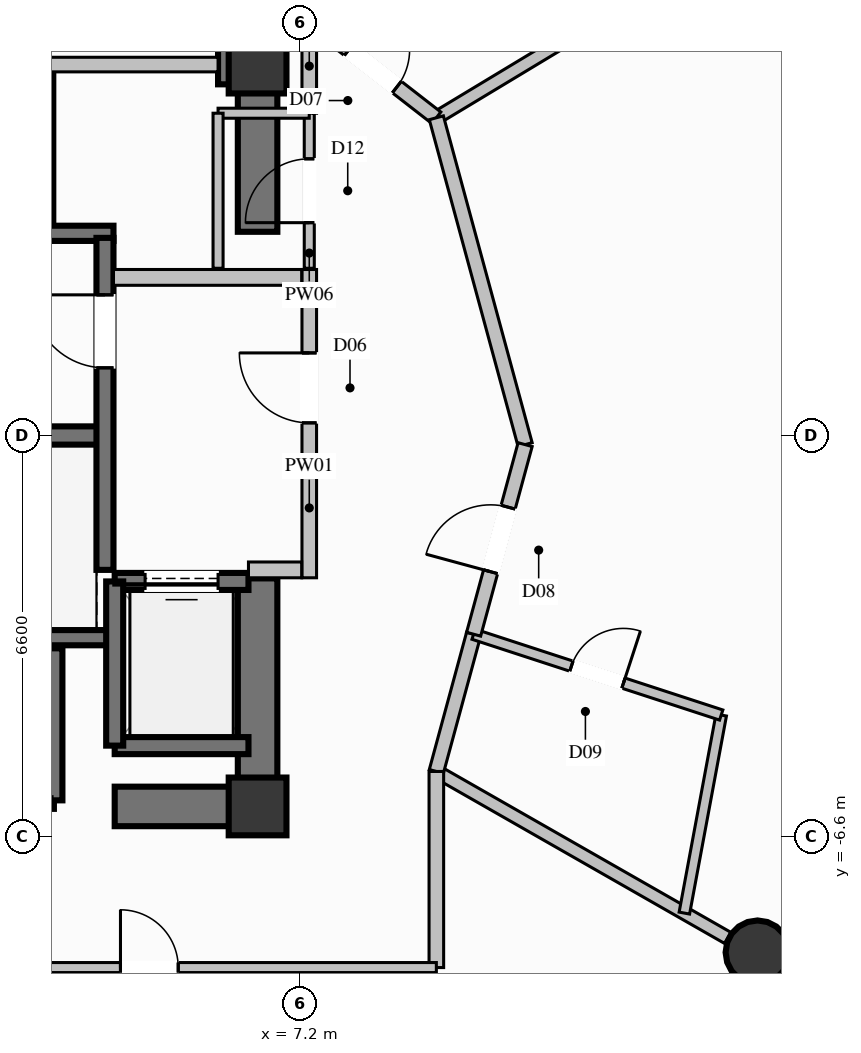
"""IFC4 building model, lengths in metres.
Left out: names, types, materials, properties, quantities, classifications, styles, units other than length and angle.
Written with IfcOpenShell. Run it as: python <this file> out.ifc"""

import sys

from ifc_helpers import new_model, si_unit, direction, frame, frame_2d, origin, origin_2d, place, context, subcontext, project, spatial, rectangle, circle, extrude, element, fill, save


model = new_model("IFC4")
c1 = context("Model", 3, precision=1e-05, world=origin(), true_north=direction((0.0, 1.0)))
c2 = subcontext(c1, "Body", "Model", "MODEL_VIEW")
j1 = project(units=[si_unit("LENGTHUNIT", "METRE"), si_unit("PLANEANGLEUNIT", "RADIAN")], contexts=[c1])
p1 = place(None, origin())
s1 = spatial("IfcSite", under=j1, at=p1, CompositionType="ELEMENT")
p2 = place(p1, origin())
s2 = spatial("IfcBuilding", under=s1, at=p2, CompositionType="ELEMENT")
p3 = place(p2, frame((0.0, 0.0, 153.0)))
s3 = spatial("IfcBuildingStorey", under=s2, at=p3, CompositionType="ELEMENT", Elevation=153.0)
for number, where, z_axis, x_axis in (
    (1, (6.5, -6.1, 0.0), (0.0, 0.0, 1.0), (1.0, 0.0, 0.0)),
    (2, (6.5, 6.1, 0.0), (0.0, 0.0, 1.0), (1.0, 0.0, 0.0)),
):
    element("IfcColumn", number, at=place(p3, frame(where, z_axis=z_axis, x_axis=x_axis)), inside=s3, PredefinedType="COLUMN", context=c2, shape_type="SweptSolid", body=[
        extrude(rectangle(XDim=0.95, YDim=0.95, at=origin_2d()), origin(), (0.0, 0.0, 1.0), 3.6),
    ])
p4 = place(p3, frame((-3.99, 0.0, 0.0), z_axis=(0.0, 0.0, 1.0), x_axis=(1.0, 0.0, 0.0)))
e3 = element("IfcWall", 3, at=p4, inside=s3, PredefinedType="SHEAR", context=c2, shape_type="SweptSolid", body=[
    extrude(rectangle(XDim=7.98, YDim=0.3, at=frame_2d((3.99, 0.0))), origin(), (0.0, 0.0, 1.0), 3.6),
])
for number, where, z_axis, x_axis in (
    (4, (-4.13, -3.325, 0.0), (0.0, 0.0, 1.0), (1.0, 0.0, 0.0)),
    (5, (-4.13, 3.325, 0.0), (0.0, 0.0, 1.0), (1.0, 0.0, 0.0)),
):
    element("IfcWall", number, at=place(p3, frame(where, z_axis=z_axis, x_axis=x_axis)), inside=s3, PredefinedType="SOLIDWALL", context=c2, shape_type="SweptSolid", body=[
        extrude(rectangle(XDim=8.26, YDim=0.25, at=frame_2d((4.13, 0.0))), origin(), (0.0, 0.0, 1.0), 3.6),
    ])
p5 = place(p3, frame((4.15, -6.1, 0.0), z_axis=(0.0, 0.0, 1.0), x_axis=(1.0, 0.0, 0.0)))
e6 = element("IfcWall", 6, at=p5, inside=s3, PredefinedType="SHEAR", context=c2, shape_type="SweptSolid", body=[
    extrude(rectangle(XDim=2.025, YDim=0.65, at=frame_2d((1.013, 0.0))), origin(), (0.0, 0.0, 1.0), 3.6),
])
p6 = place(p3, frame((5.85, 6.1, 0.0), z_axis=(0.0, 0.0, 1.0), x_axis=(1.0, 0.0, 0.0)))
e7 = element("IfcWall", 7, at=p6, inside=s3, PredefinedType="SHEAR", context=c2, shape_type="SweptSolid", body=[
    extrude(rectangle(XDim=0.325, YDim=0.65, at=frame_2d((0.163, 0.0))), origin(), (0.0, 0.0, 1.0), 3.6),
])
p7 = place(p3, frame((6.5, -6.425, 0.0), z_axis=(0.0, 0.0, 1.0), x_axis=(0.0, 1.0, 0.0)))
e8 = element("IfcWall", 8, at=p7, inside=s3, PredefinedType="SHEAR", context=c2, shape_type="SweptSolid", body=[
    extrude(rectangle(XDim=4.075, YDim=0.65, at=frame_2d((2.038, 0.0))), origin(), (0.0, 0.0, 1.0), 3.6),
])
p8 = place(p3, frame((6.5, 3.35, 0.0), z_axis=(0.0, 0.0, 1.0), x_axis=(0.0, 1.0, 0.0)))
e9 = element("IfcWall", 9, at=p8, inside=s3, PredefinedType="SHEAR", context=c2, shape_type="SweptSolid", body=[
    extrude(rectangle(XDim=3.075, YDim=0.65, at=frame_2d((1.538, 0.0))), origin(), (0.0, 0.0, 1.0), 3.6),
])
p9 = place(p3, frame((14.722, -8.5, 0.0), z_axis=(0.0, 0.0, 1.0), x_axis=(1.0, 0.0, 0.0)))
e10 = element("IfcColumn", 10, at=p9, inside=s3, PredefinedType="COLUMN", context=c2, shape_type="SweptSolid", body=[
    extrude(circle(Radius=0.525, at=origin_2d()), origin(), (0.0, 0.0, 1.0), 3.6),
])
p10 = place(p3, frame((1.05, -6.0, 0.0), z_axis=(0.0, 0.0, 1.0), x_axis=(1.0, 0.0, 0.0)))
e11 = element("IfcWall", 11, at=p10, inside=s3, PredefinedType="SOLIDWALL", context=c2, shape_type="SweptSolid", body=[
    extrude(rectangle(XDim=2.1, YDim=0.28, at=frame_2d((1.05, 0.0))), origin(), (0.0, 0.0, 1.0), 3.35),
])
p11 = place(p10, frame((0.5, 0.0, 0.0)))
e12 = element("IfcOpeningElement", 12, at=p11, cuts=e11, PredefinedType="OPENING", context=c2, shape_type="SweptSolid", body=[
    extrude(rectangle(XDim=1.1, YDim=2.2, at=frame_2d((0.55, 1.1))), frame((0.0, 0.15, 0.0), z_axis=(0.0, -1.0, 0.0), x_axis=(1.0, 0.0, 0.0)), (0.0, 0.0, 1.0), 0.3),
])
for number, where, z_axis, x_axis in (
    (13, (3.15, -6.0, 0.0), (0.0, 0.0, 1.0), (0.0, 1.0, 0.0)),
    (14, (3.0, 3.5, 0.0), (0.0, 0.0, 1.0), (0.0, 1.0, 0.0)),
):
    element("IfcWall", number, at=place(p3, frame(where, z_axis=z_axis, x_axis=x_axis)), inside=s3, PredefinedType="SOLIDWALL", context=c2, shape_type="SweptSolid", body=[
        extrude(rectangle(XDim=2.5, YDim=0.28, at=frame_2d((1.25, 0.0))), origin(), (0.0, 0.0, 1.0), 3.35),
    ])
p12 = place(p3, frame((4.15, -5.1, 0.0), z_axis=(0.0, 0.0, 1.0), x_axis=(1.0, 0.0, 0.0)))
e15 = element("IfcWall", 15, at=p12, inside=s3, PredefinedType="SOLIDWALL", context=c2, shape_type="SweptSolid", body=[
    extrude(rectangle(XDim=2.2, YDim=0.28, at=frame_2d((1.1, 0.0))), origin(), (0.0, 0.0, 1.0), 3.35),
])
p13 = place(p3, frame((6.35, -2.4, 0.0), z_axis=(0.0, 0.0, 1.0), x_axis=(-1.0, 0.0, 0.0)))
e16 = element("IfcWall", 16, at=p13, inside=s3, PredefinedType="SOLIDWALL", context=c2, shape_type="SweptSolid", body=[
    extrude(rectangle(XDim=2.2, YDim=0.28, at=frame_2d((1.1, 0.0))), origin(), (0.0, 0.0, 1.0), 3.35),
])
p14 = place(p13, frame((0.5, 0.0, 0.0)))
e17 = element("IfcOpeningElement", 17, at=p14, cuts=e16, PredefinedType="OPENING", context=c2, shape_type="SweptSolid", body=[
    extrude(rectangle(XDim=1.2, YDim=2.2, at=frame_2d((0.6, 1.1))), frame((0.0, 0.15, 0.0), z_axis=(0.0, -1.0, 0.0), x_axis=(1.0, 0.0, 0.0)), (0.0, 0.0, 1.0), 0.3),
])
p15 = place(p3, frame((4.15, -2.4, 0.0), z_axis=(0.0, 0.0, 1.0), x_axis=(0.0, -1.0, 0.0)))
e18 = element("IfcWall", 18, at=p15, inside=s3, PredefinedType="SOLIDWALL", context=c2, shape_type="SweptSolid", body=[
    extrude(rectangle(XDim=2.7, YDim=0.28, at=frame_2d((1.35, 0.0))), origin(), (0.0, 0.0, 1.0), 3.35),
])
p16 = place(p3, frame((3.99, -2.21, 0.0), z_axis=(0.0, 0.0, 1.0), x_axis=(0.0, 1.0, 0.0)))
e19 = element("IfcWall", 19, at=p16, inside=s3, PredefinedType="SOLIDWALL", context=c2, shape_type="SweptSolid", body=[
    extrude(rectangle(XDim=5.46, YDim=0.28, at=frame_2d((2.73, 0.0))), origin(), (0.0, 0.0, 1.0), 3.35),
])
p17 = place(p16, frame((3.323, 0.0, 0.0)))
e20 = element("IfcOpeningElement", 20, at=p17, cuts=e19, PredefinedType="OPENING", context=c2, shape_type="SweptSolid", body=[
    extrude(rectangle(XDim=1.2, YDim=2.2, at=frame_2d((0.6, 1.1))), frame((0.0, 0.15, 0.0), z_axis=(0.0, -1.0, 0.0), x_axis=(1.0, 0.0, 0.0)), (0.0, 0.0, 1.0), 0.3),
])
p18 = place(p3, frame((7.35, -2.34, 0.0), z_axis=(0.0, 0.0, 1.0), x_axis=(0.0, 1.0, 0.0)))
e21 = element("IfcWall", 21, at=p18, inside=s3, PredefinedType="PARTITIONING", context=c2, shape_type="SweptSolid", body=[
    extrude(rectangle(XDim=5.07, YDim=0.24, at=frame_2d((2.535, 0.0))), origin(), (0.0, 0.0, 1.0), 2.435),
])
p19 = place(p18, frame((2.548, 0.0, 0.0)))
e22 = element("IfcOpeningElement", 22, at=p19, cuts=e21, PredefinedType="OPENING", context=c2, shape_type="SweptSolid", body=[
    extrude(rectangle(XDim=1.15, YDim=2.2, at=frame_2d((0.575, 1.1))), frame((0.0, 0.13, 0.0), z_axis=(0.0, -1.0, 0.0), x_axis=(1.0, 0.0, 0.0)), (0.0, 0.0, 1.0), 0.26),
])
p20 = place(p3, frame((6.35, -2.21, 0.0), z_axis=(0.0, 0.0, 1.0), x_axis=(1.0, 0.0, 0.0)))
e23 = element("IfcWall", 23, at=p20, inside=s3, PredefinedType="PARTITIONING", context=c2, shape_type="SweptSolid", body=[
    extrude(rectangle(XDim=0.875, YDim=0.26, at=frame_2d((0.438, 0.0))), origin(), (0.0, 0.0, 1.0), 3.35),
])
p21 = place(p3, frame((4.13, 2.6, 0.0), z_axis=(0.0, 0.0, 1.0), x_axis=(1.0, 0.0, 0.0)))
e24 = element("IfcWall", 24, at=p21, inside=s3, PredefinedType="PARTITIONING", context=c2, shape_type="SweptSolid", body=[
    extrude(rectangle(XDim=3.095, YDim=0.26, at=frame_2d((1.548, 0.0))), origin(), (0.0, 0.0, 1.0), 3.35),
])
p22 = place(p3, frame((7.35, 5.3, 0.0), z_axis=(0.0, 0.0, 1.0), x_axis=(0.0, 1.0, 0.0)))
e25 = element("IfcWall", 25, at=p22, inside=s3, PredefinedType="PARTITIONING", context=c2, shape_type="SweptSolid", body=[
    extrude(rectangle(XDim=1.55, YDim=0.24, at=frame_2d((0.775, 0.0))), origin(), (0.0, 0.0, 1.0), 2.435),
])
p23 = place(p3, frame((3.0, 6.1, 0.0), z_axis=(0.0, 0.0, 1.0), x_axis=(1.0, 0.0, 0.0)))
e26 = element("IfcWall", 26, at=p23, inside=s3, PredefinedType="PARTITIONING", context=c2, shape_type="SweptSolid", body=[
    extrude(rectangle(XDim=2.85, YDim=0.24, at=frame_2d((1.425, 0.0))), origin(), (0.0, 0.0, 1.0), 2.435),
])
p24 = place(p3, frame((7.35, 2.75, 0.0), z_axis=(0.0, 0.0, 1.0), x_axis=(0.0, 1.0, 0.0)))
e27 = element("IfcWall", 27, at=p24, inside=s3, PredefinedType="PARTITIONING", context=c2, shape_type="SweptSolid", body=[
    extrude(rectangle(XDim=2.55, YDim=0.165, at=frame_2d((1.275, 0.0))), origin(), (0.0, 0.0, 1.0), 3.35),
])
p25 = place(p24, frame((0.75, 0.0, 0.0)))
e28 = element("IfcOpeningElement", 28, at=p25, cuts=e27, PredefinedType="OPENING", context=c2, shape_type="SweptSolid", body=[
    extrude(rectangle(XDim=1.05, YDim=2.15, at=frame_2d((0.525, 1.075))), frame((0.0, 0.093, 0.0), z_axis=(0.0, -1.0, 0.0), x_axis=(1.0, 0.0, 0.0)), (0.0, 0.0, 1.0), 0.185),
])
p26 = place(p3, frame((7.35, 5.3, 0.0), z_axis=(0.0, 0.0, 1.0), x_axis=(-1.0, 0.0, 0.0)))
e29 = element("IfcWall", 29, at=p26, inside=s3, PredefinedType="PARTITIONING", context=c2, shape_type="SweptSolid", body=[
    extrude(rectangle(XDim=1.5, YDim=0.165, at=frame_2d((0.75, 0.0))), origin(), (0.0, 0.0, 1.0), 2.435),
])
p27 = place(p3, frame((5.85, 5.3, 0.0), z_axis=(0.0, 0.0, 1.0), x_axis=(0.0, -1.0, 0.0)))
e30 = element("IfcWall", 30, at=p27, inside=s3, PredefinedType="PARTITIONING", context=c2, shape_type="SweptSolid", body=[
    extrude(rectangle(XDim=2.55, YDim=0.165, at=frame_2d((1.275, 0.0))), origin(), (0.0, 0.0, 1.0), 2.435),
])
p28 = place(p3, frame((9.44, 5.225, 0.0), z_axis=(0.0, 0.0, 1.0), x_axis=(0.856412995276, 0.516291372698, 0.0)))
e31 = element("IfcWall", 31, at=p28, inside=s3, PredefinedType="PARTITIONING", context=c2, shape_type="SweptSolid", body=[
    extrude(rectangle(XDim=5.675, YDim=0.21, at=frame_2d((2.837, 0.0))), origin(), (0.0, 0.0, 1.0), 2.791),
])
p29 = place(p3, frame((9.44, -5.525, 0.0), z_axis=(0.0, 0.0, 1.0), x_axis=(0.868338411793, -0.495972179265, 0.0)))
e32 = element("IfcWall", 32, at=p29, inside=s3, PredefinedType="PARTITIONING", context=c2, shape_type="SweptSolid", body=[
    extrude(rectangle(XDim=5.519, YDim=0.21, at=frame_2d((2.759, 0.0))), origin(), (0.0, 0.0, 1.0), 2.791),
])
p30 = place(p3, frame((15.176, -8.801, 0.0), z_axis=(0.0, 0.0, 1.0), x_axis=(0.868374410063, -0.495909148885, 0.0)))
e33 = element("IfcWall", 33, at=p30, inside=s3, PredefinedType="PARTITIONING", context=c2, shape_type="SweptSolid", body=[
    extrude(rectangle(XDim=7.209, YDim=0.21, at=frame_2d((3.604, 0.0))), origin(), (0.0, 0.0, 1.0), 3.35),
])
p31 = place(p3, frame((7.35, 6.85, 0.0), z_axis=(0.0, 0.0, 1.0), x_axis=(0.789431664708, -0.613838453306, 0.0)))
e34 = element("IfcWall", 34, at=p31, inside=s3, PredefinedType="PARTITIONING", context=c2, shape_type="SweptSolid", body=[
    extrude(rectangle(XDim=2.647, YDim=0.24, at=frame_2d((1.324, 0.0))), origin(), (0.0, 0.0, 1.0), 3.35),
])
p32 = place(p31, frame((0.824, 0.0, 0.0)))
e35 = element("IfcOpeningElement", 35, at=p32, cuts=e34, PredefinedType="OPENING", context=c2, shape_type="SweptSolid", body=[
    extrude(rectangle(XDim=1.0, YDim=2.2, at=frame_2d((0.5, 1.1))), frame((0.0, 0.13, 0.0), z_axis=(0.0, -1.0, 0.0), x_axis=(1.0, 0.0, 0.0)), (0.0, 0.0, 1.0), 0.26),
])
p33 = place(p3, frame((9.44, -5.525, 0.0), z_axis=(0.0, 0.0, 1.0), x_axis=(0.262136756532, 0.965030735715, 0.0)))
e36 = element("IfcWall", 36, at=p33, inside=s3, PredefinedType="PARTITIONING", context=c2, shape_type="SweptSolid", body=[
    extrude(rectangle(XDim=2.339, YDim=0.24, at=frame_2d((1.169, 0.0))), origin(), (0.0, 0.0, 1.0), 3.35),
])
p34 = place(p3, frame((13.519, -7.854, 0.0), z_axis=(0.0, 0.0, 1.0), x_axis=(0.182904603297, 0.983130665829, 0.0)))
e37 = element("IfcWall", 37, at=p34, inside=s3, PredefinedType="PLUMBINGWALL", context=c2, shape_type="SweptSolid", body=[
    extrude(rectangle(XDim=3.313, YDim=0.175, at=frame_2d((1.656, 0.0))), origin(), (0.0, 0.0, 1.0), 3.35),
])
p35 = place(p3, frame((10.053, -3.268, 0.0), z_axis=(0.0, 0.0, 1.0), x_axis=(0.95065932904, -0.310236748484, 0.0)))
e38 = element("IfcWall", 38, at=p35, inside=s3, PredefinedType="PLUMBINGWALL", context=c2, shape_type="SweptSolid", body=[
    extrude(rectangle(XDim=4.283, YDim=0.175, at=frame_2d((2.142, 0.0))), origin(), (0.0, 0.0, 1.0), 3.35),
])
p36 = place(p35, frame((1.692, 0.0, 0.0)))
e39 = element("IfcOpeningElement", 39, at=p36, cuts=e38, PredefinedType="OPENING", context=c2, shape_type="SweptSolid", body=[
    extrude(rectangle(XDim=0.9, YDim=2.1, at=frame_2d((0.45, 1.05))), frame((0.0, 0.098, 0.0), z_axis=(0.0, -1.0, 0.0), x_axis=(1.0, 0.0, 0.0)), (0.0, 0.0, 1.0), 0.195),
])
p37 = place(p3, frame((10.9, -0.15, 0.0), z_axis=(0.0, 0.0, 1.0), x_axis=(-0.262123261283, 0.965034401405, 0.0)))
e40 = element("IfcWall", 40, at=p37, inside=s3, PredefinedType="PARTITIONING", context=c2, shape_type="SweptSolid", body=[
    extrude(rectangle(XDim=5.57, YDim=0.24, at=frame_2d((2.785, 0.0))), origin(), (0.0, 0.0, 1.0), 2.985),
])
p38 = place(p3, frame((10.053, -3.268, 0.0), z_axis=(0.0, 0.0, 1.0), x_axis=(0.26211349372, 0.965037054423, 0.0)))
e41 = element("IfcWall", 41, at=p38, inside=s3, PredefinedType="PARTITIONING", context=c2, shape_type="SweptSolid", body=[
    extrude(rectangle(XDim=3.231, YDim=0.24, at=frame_2d((1.616, 0.0))), origin(), (0.0, 0.0, 1.0), 2.985),
])
p39 = place(p38, frame((1.065, 0.0, 0.0)))
e42 = element("IfcOpeningElement", 42, at=p39, cuts=e41, PredefinedType="OPENING", context=c2, shape_type="SweptSolid", body=[
    extrude(rectangle(XDim=1.1, YDim=2.3, at=frame_2d((0.55, 1.15))), frame((0.0, 0.13, 0.0), z_axis=(0.0, -1.0, 0.0), x_axis=(1.0, 0.0, 0.0)), (0.0, 0.0, 1.0), 0.26),
])
p40 = place(p3, frame((9.44, -8.75, 0.0), z_axis=(0.0, 0.0, 1.0), x_axis=(0.0, 1.0, 0.0)))
e43 = element("IfcWall", 43, at=p40, inside=s3, PredefinedType="PARTITIONING", context=c2, shape_type="SweptSolid", body=[
    extrude(rectangle(XDim=3.225, YDim=0.24, at=frame_2d((1.613, 0.0))), origin(), (0.0, 0.0, 1.0), 3.35),
])
p41 = place(p3, frame((0.0, -8.75, 0.0), z_axis=(0.0, 0.0, 1.0), x_axis=(1.0, 0.0, 0.0)))
e44 = element("IfcWall", 44, at=p41, inside=s3, PredefinedType="PARTITIONING", context=c2, shape_type="SweptSolid", body=[
    extrude(rectangle(XDim=9.44, YDim=0.165, at=frame_2d((4.72, 0.0))), origin(), (0.0, 0.0, 1.0), 3.35),
])
p42 = place(p41, frame((4.245, 0.0, 0.0)))
e45 = element("IfcOpeningElement", 45, at=p42, cuts=e44, PredefinedType="OPENING", context=c2, shape_type="SweptSolid", body=[
    extrude(rectangle(XDim=0.95, YDim=2.1, at=frame_2d((0.475, 1.05))), frame((0.0, 0.093, 0.0), z_axis=(0.0, -1.0, 0.0), x_axis=(1.0, 0.0, 0.0)), (0.0, 0.0, 1.0), 0.185),
])
p43 = place(p14, origin())
e46 = element("IfcDoor", 46, at=p43, inside=s3, OperationType="SLIDING_TO_LEFT", PredefinedType="DOOR", context=c2, shape_type="SweptSolid", body=[
    extrude(rectangle(XDim=1.2, YDim=2.2, at=frame_2d((0.6, 1.1))), frame((0.0, 0.025, 0.0), z_axis=(0.0, -1.0, 0.0), x_axis=(1.0, 0.0, 0.0)), (0.0, 0.0, 1.0), 0.05),
])
fill(e17, e46)
p44 = place(p17, origin())
e47 = element("IfcDoor", 47, at=p44, inside=s3, OperationType="SINGLE_SWING_RIGHT", PredefinedType="DOOR", context=c2, shape_type="SweptSolid", body=[
    extrude(rectangle(XDim=1.2, YDim=2.2, at=frame_2d((0.6, 1.1))), frame((0.0, 0.025, 0.0), z_axis=(0.0, -1.0, 0.0), x_axis=(1.0, 0.0, 0.0)), (0.0, 0.0, 1.0), 0.05),
])
fill(e20, e47)
p45 = place(p19, origin())
e48 = element("IfcDoor", 48, at=p45, inside=s3, OperationType="SINGLE_SWING_RIGHT", PredefinedType="DOOR", context=c2, shape_type="SweptSolid", body=[
    extrude(rectangle(XDim=1.15, YDim=2.2, at=frame_2d((0.575, 1.1))), frame((0.0, 0.025, 0.0), z_axis=(0.0, -1.0, 0.0), x_axis=(1.0, 0.0, 0.0)), (0.0, 0.0, 1.0), 0.05),
])
fill(e22, e48)
p46 = place(p25, origin())
e49 = element("IfcDoor", 49, at=p46, inside=s3, OperationType="SINGLE_SWING_LEFT", PredefinedType="DOOR", context=c2, shape_type="SweptSolid", body=[
    extrude(rectangle(XDim=1.05, YDim=2.15, at=frame_2d((0.525, 1.075))), frame((0.0, 0.025, 0.0), z_axis=(0.0, -1.0, 0.0), x_axis=(1.0, 0.0, 0.0)), (0.0, 0.0, 1.0), 0.05),
])
fill(e28, e49)
p47 = place(p32, origin())
e50 = element("IfcDoor", 50, at=p47, inside=s3, OperationType="SINGLE_SWING_LEFT", PredefinedType="DOOR", context=c2, shape_type="SweptSolid", body=[
    extrude(rectangle(XDim=1.0, YDim=2.2, at=frame_2d((0.5, 1.1))), frame((0.0, 0.025, 0.0), z_axis=(0.0, -1.0, 0.0), x_axis=(1.0, 0.0, 0.0)), (0.0, 0.0, 1.0), 0.05),
])
fill(e35, e50)
p48 = place(p36, origin())
e51 = element("IfcDoor", 51, at=p48, inside=s3, OperationType="SINGLE_SWING_RIGHT", PredefinedType="DOOR", context=c2, shape_type="SweptSolid", body=[
    extrude(rectangle(XDim=0.9, YDim=2.1, at=frame_2d((0.45, 1.05))), frame((0.0, 0.025, 0.0), z_axis=(0.0, -1.0, 0.0), x_axis=(1.0, 0.0, 0.0)), (0.0, 0.0, 1.0), 0.05),
])
fill(e39, e51)
p49 = place(p39, origin())
e52 = element("IfcDoor", 52, at=p49, inside=s3, OperationType="SINGLE_SWING_LEFT", PredefinedType="DOOR", context=c2, shape_type="SweptSolid", body=[
    extrude(rectangle(XDim=1.1, YDim=2.3, at=frame_2d((0.55, 1.15))), frame((0.0, 0.025, 0.0), z_axis=(0.0, -1.0, 0.0), x_axis=(1.0, 0.0, 0.0)), (0.0, 0.0, 1.0), 0.05),
])
fill(e42, e52)
p50 = place(p42, origin())
e53 = element("IfcDoor", 53, at=p50, inside=s3, OperationType="SINGLE_SWING_LEFT", PredefinedType="DOOR", context=c2, shape_type="SweptSolid", body=[
    extrude(rectangle(XDim=0.95, YDim=2.1, at=frame_2d((0.475, 1.05))), frame((0.0, 0.025, 0.0), z_axis=(0.0, -1.0, 0.0), x_axis=(1.0, 0.0, 0.0)), (0.0, 0.0, 1.0), 0.05),
])
fill(e45, e53)
save(model, sys.argv[1])
